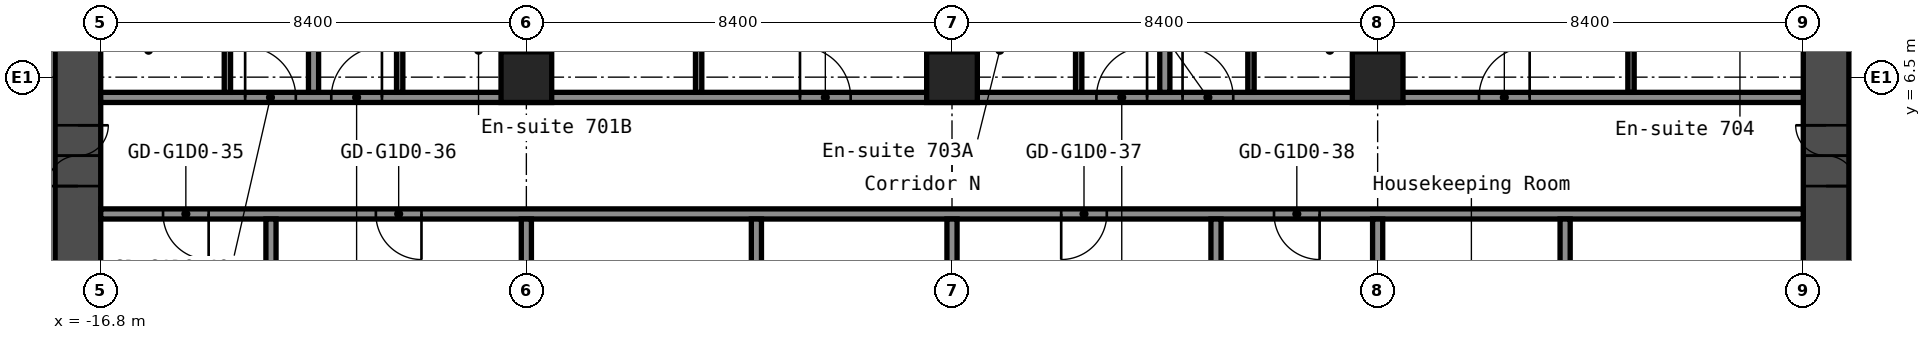
"""IFC4 building model, lengths in metres.
Left out: names, types, materials, properties, quantities, classifications, styles, units other than length and angle.
Written with IfcOpenShell. Run it as: python <this file> out.ifc"""

import sys

from ifc_helpers import new_model, si_unit, direction, frame, frame_2d, origin, origin_2d, place, context, subcontext, project, spatial, rectangle, hollow_rectangle, extrude, element, fill, save


model = new_model("IFC4")
c1 = context("Model", 3, precision=1e-05, world=origin(), true_north=direction((0.0, 1.0)))
c2 = subcontext(c1, "Body", "Model", "MODEL_VIEW")
j1 = project(units=[si_unit("LENGTHUNIT", "METRE"), si_unit("PLANEANGLEUNIT", "RADIAN")], contexts=[c1])
p1 = place(None, origin())
s1 = spatial("IfcSite", under=j1, at=p1, CompositionType="ELEMENT")
p2 = place(p1, origin())
s2 = spatial("IfcBuilding", under=s1, at=p2, CompositionType="ELEMENT")
p3 = place(p2, frame((0.0, 0.0, 29.4)))
s3 = spatial("IfcBuildingStorey", under=s2, at=p3, CompositionType="ELEMENT", Elevation=29.4)
for number, where, z_axis, x_axis in (
    (1, (-8.4, 6.5, 0.0), (0.0, 0.0, 1.0), (1.0, 0.0, 0.0)),
    (2, (0.0, 6.5, 0.0), (0.0, 0.0, 1.0), (1.0, 0.0, 0.0)),
    (3, (8.4, 6.5, 0.0), (0.0, 0.0, 1.0), (1.0, 0.0, 0.0)),
):
    element("IfcColumn", number, at=place(p3, frame(where, z_axis=z_axis, x_axis=x_axis)), inside=s3, PredefinedType="COLUMN", context=c2, shape_type="SweptSolid", body=[
        extrude(hollow_rectangle(XDim=1.0, YDim=1.0, WallThickness=0.04, at=origin_2d()), origin(), (0.0, 0.0, 1.0), 2.8),
    ])
p4 = place(p3, frame((-17.25, -8.4, 0.0), z_axis=(0.0, 0.0, 1.0), x_axis=(0.0, 1.0, 0.0)))
e4 = element("IfcWall", 4, at=p4, inside=s3, PredefinedType="SHEAR", context=c2, shape_type="SweptSolid", body=[
    extrude(rectangle(XDim=16.8, YDim=0.9, at=frame_2d((8.4, 0.0))), origin(), (0.0, 0.0, 1.0), 2.8),
])
p5 = place(p4, frame((12.75, 0.0, 0.0)))
e5 = element("IfcOpeningElement", 5, at=p5, cuts=e4, PredefinedType="OPENING", context=c2, shape_type="SweptSolid", body=[
    extrude(rectangle(XDim=1.2, YDim=2.1, at=frame_2d((0.6, 1.05))), frame((0.0, 0.46, 0.0), z_axis=(0.0, -1.0, 0.0), x_axis=(1.0, 0.0, 0.0)), (0.0, 0.0, 1.0), 0.92),
])
p6 = place(p4, frame((2.85, 0.0, 0.0)))
e6 = element("IfcOpeningElement", 6, at=p6, cuts=e4, PredefinedType="OPENING", context=c2, shape_type="SweptSolid", body=[
    extrude(rectangle(XDim=1.2, YDim=2.1, at=frame_2d((0.6, 1.05))), frame((0.0, 0.46, 0.0), z_axis=(0.0, -1.0, 0.0), x_axis=(1.0, 0.0, 0.0)), (0.0, 0.0, 1.0), 0.92),
])
p7 = place(p3, frame((17.25, -8.4, 0.0), z_axis=(0.0, 0.0, 1.0), x_axis=(0.0, 1.0, 0.0)))
e7 = element("IfcWall", 7, at=p7, inside=s3, PredefinedType="SHEAR", context=c2, shape_type="SweptSolid", body=[
    extrude(rectangle(XDim=16.8, YDim=0.9, at=frame_2d((8.4, 0.0))), origin(), (0.0, 0.0, 1.0), 2.8),
])
p8 = place(p7, frame((12.75, 0.0, 0.0)))
e8 = element("IfcOpeningElement", 8, at=p8, cuts=e7, PredefinedType="OPENING", context=c2, shape_type="SweptSolid", body=[
    extrude(rectangle(XDim=1.2, YDim=2.1, at=frame_2d((0.6, 1.05))), frame((0.0, 0.46, 0.0), z_axis=(0.0, -1.0, 0.0), x_axis=(1.0, 0.0, 0.0)), (0.0, 0.0, 1.0), 0.92),
])
p9 = place(p7, frame((2.85, 0.0, 0.0)))
e9 = element("IfcOpeningElement", 9, at=p9, cuts=e7, PredefinedType="OPENING", context=c2, shape_type="SweptSolid", body=[
    extrude(rectangle(XDim=1.2, YDim=2.1, at=frame_2d((0.6, 1.05))), frame((0.0, 0.46, 0.0), z_axis=(0.0, -1.0, 0.0), x_axis=(1.0, 0.0, 0.0)), (0.0, 0.0, 1.0), 0.92),
])
p10 = place(p3, frame((-16.8, 3.8, 0.0), z_axis=(0.0, 0.0, 1.0), x_axis=(1.0, 0.0, 0.0)))
e10 = element("IfcWall", 10, at=p10, inside=s3, PredefinedType="PARTITIONING", context=c2, shape_type="SweptSolid", body=[
    extrude(rectangle(XDim=33.6, YDim=0.2, at=frame_2d((16.8, 0.0))), origin(), (0.0, 0.0, 1.0), 2.8),
])
p11 = place(p10, frame((1.23, 0.0, 0.0)))
e11 = element("IfcOpeningElement", 11, at=p11, cuts=e10, PredefinedType="OPENING", context=c2, shape_type="SweptSolid", body=[
    extrude(rectangle(XDim=0.9, YDim=2.1, at=frame_2d((0.45, 1.05))), frame((0.0, 0.11, 0.0), z_axis=(0.0, -1.0, 0.0), x_axis=(1.0, 0.0, 0.0)), (0.0, 0.0, 1.0), 0.22),
])
p12 = place(p10, frame((5.43, 0.0, 0.0)))
e12 = element("IfcOpeningElement", 12, at=p12, cuts=e10, PredefinedType="OPENING", context=c2, shape_type="SweptSolid", body=[
    extrude(rectangle(XDim=0.9, YDim=2.1, at=frame_2d((0.45, 1.05))), frame((0.0, 0.11, 0.0), z_axis=(0.0, -1.0, 0.0), x_axis=(1.0, 0.0, 0.0)), (0.0, 0.0, 1.0), 0.22),
])
p13 = place(p10, frame((18.955, 0.0, 0.0)))
e13 = element("IfcOpeningElement", 13, at=p13, cuts=e10, PredefinedType="OPENING", context=c2, shape_type="SweptSolid", body=[
    extrude(rectangle(XDim=0.9, YDim=2.1, at=frame_2d((0.45, 1.05))), frame((0.0, 0.11, 0.0), z_axis=(0.0, -1.0, 0.0), x_axis=(1.0, 0.0, 0.0)), (0.0, 0.0, 1.0), 0.22),
])
p14 = place(p10, frame((23.155, 0.0, 0.0)))
e14 = element("IfcOpeningElement", 14, at=p14, cuts=e10, PredefinedType="OPENING", context=c2, shape_type="SweptSolid", body=[
    extrude(rectangle(XDim=0.9, YDim=2.1, at=frame_2d((0.45, 1.05))), frame((0.0, 0.11, 0.0), z_axis=(0.0, -1.0, 0.0), x_axis=(1.0, 0.0, 0.0)), (0.0, 0.0, 1.0), 0.22),
])
p15 = place(p3, frame((-16.8, 6.1, 0.0), z_axis=(0.0, 0.0, 1.0), x_axis=(1.0, 0.0, 0.0)))
e15 = element("IfcWall", 15, at=p15, inside=s3, PredefinedType="PARTITIONING", context=c2, shape_type="SweptSolid", body=[
    extrude(rectangle(XDim=33.6, YDim=0.2, at=frame_2d((16.8, 0.0))), origin(), (0.0, 0.0, 1.0), 2.8),
])
p16 = place(p15, frame((2.85, 0.0, 0.0)))
e16 = element("IfcOpeningElement", 16, at=p16, cuts=e15, PredefinedType="OPENING", context=c2, shape_type="SweptSolid", body=[
    extrude(rectangle(XDim=1.0, YDim=2.1, at=frame_2d((0.5, 1.05))), frame((0.0, 0.11, 0.0), z_axis=(0.0, -1.0, 0.0), x_axis=(1.0, 0.0, 0.0)), (0.0, 0.0, 1.0), 0.22),
])
p17 = place(p15, frame((4.55, 0.0, 0.0)))
e17 = element("IfcOpeningElement", 17, at=p17, cuts=e15, PredefinedType="OPENING", context=c2, shape_type="SweptSolid", body=[
    extrude(rectangle(XDim=1.0, YDim=2.1, at=frame_2d((0.5, 1.05))), frame((0.0, 0.11, 0.0), z_axis=(0.0, -1.0, 0.0), x_axis=(1.0, 0.0, 0.0)), (0.0, 0.0, 1.0), 0.22),
])
p18 = place(p15, frame((13.8, 0.0, 0.0)))
e18 = element("IfcOpeningElement", 18, at=p18, cuts=e15, PredefinedType="OPENING", context=c2, shape_type="SweptSolid", body=[
    extrude(rectangle(XDim=1.0, YDim=2.1, at=frame_2d((0.5, 1.05))), frame((0.0, 0.11, 0.0), z_axis=(0.0, -1.0, 0.0), x_axis=(1.0, 0.0, 0.0)), (0.0, 0.0, 1.0), 0.22),
])
p19 = place(p15, frame((19.65, 0.0, 0.0)))
e19 = element("IfcOpeningElement", 19, at=p19, cuts=e15, PredefinedType="OPENING", context=c2, shape_type="SweptSolid", body=[
    extrude(rectangle(XDim=1.0, YDim=2.1, at=frame_2d((0.5, 1.05))), frame((0.0, 0.11, 0.0), z_axis=(0.0, -1.0, 0.0), x_axis=(1.0, 0.0, 0.0)), (0.0, 0.0, 1.0), 0.22),
])
p20 = place(p15, frame((21.35, 0.0, 0.0)))
e20 = element("IfcOpeningElement", 20, at=p20, cuts=e15, PredefinedType="OPENING", context=c2, shape_type="SweptSolid", body=[
    extrude(rectangle(XDim=1.0, YDim=2.1, at=frame_2d((0.5, 1.05))), frame((0.0, 0.11, 0.0), z_axis=(0.0, -1.0, 0.0), x_axis=(1.0, 0.0, 0.0)), (0.0, 0.0, 1.0), 0.22),
])
p21 = place(p15, frame((27.2, 0.0, 0.0)))
e21 = element("IfcOpeningElement", 21, at=p21, cuts=e15, PredefinedType="OPENING", context=c2, shape_type="SweptSolid", body=[
    extrude(rectangle(XDim=1.0, YDim=2.1, at=frame_2d((0.5, 1.05))), frame((0.0, 0.11, 0.0), z_axis=(0.0, -1.0, 0.0), x_axis=(1.0, 0.0, 0.0)), (0.0, 0.0, 1.0), 0.22),
])
p22 = place(p3, frame((-14.3, 6.2, 0.0), z_axis=(0.0, 0.0, 1.0), x_axis=(0.0, 1.0, 0.0)))
e22 = element("IfcWall", 22, at=p22, inside=s3, PredefinedType="PARTITIONING", context=c2, shape_type="SweptSolid", body=[
    extrude(rectangle(XDim=2.9, YDim=0.125, at=frame_2d((1.45, 0.0))), origin(), (0.0, 0.0, 1.0), 2.8),
])
p23 = place(p22, frame((1.5, 0.0, 0.0)))
e23 = element("IfcOpeningElement", 23, at=p23, cuts=e22, PredefinedType="OPENING", context=c2, shape_type="SweptSolid", body=[
    extrude(rectangle(XDim=0.8, YDim=2.1, at=frame_2d((0.4, 1.05))), frame((0.0, 0.073, 0.0), z_axis=(0.0, -1.0, 0.0), x_axis=(1.0, 0.0, 0.0)), (0.0, 0.0, 1.0), 0.145),
])
p24 = place(p3, frame((-13.44, -3.7, 0.0), z_axis=(0.0, 0.0, 1.0), x_axis=(0.0, 1.0, 0.0)))
e24 = element("IfcWall", 24, at=p24, inside=s3, PredefinedType="PARTITIONING", context=c2, shape_type="SweptSolid", body=[
    extrude(rectangle(XDim=7.4, YDim=0.2, at=frame_2d((3.7, 0.0))), origin(), (0.0, 0.0, 1.0), 2.8),
])
p25 = place(p3, frame((-12.6, 6.2, 0.0), z_axis=(0.0, 0.0, 1.0), x_axis=(0.0, 1.0, 0.0)))
e25 = element("IfcWall", 25, at=p25, inside=s3, PredefinedType="PARTITIONING", context=c2, shape_type="SweptSolid", body=[
    extrude(rectangle(XDim=14.1, YDim=0.2, at=frame_2d((7.05, 0.0))), origin(), (0.0, 0.0, 1.0), 2.8),
])
p26 = place(p3, frame((-10.9, 6.2, 0.0), z_axis=(0.0, 0.0, 1.0), x_axis=(0.0, 1.0, 0.0)))
e26 = element("IfcWall", 26, at=p26, inside=s3, PredefinedType="PARTITIONING", context=c2, shape_type="SweptSolid", body=[
    extrude(rectangle(XDim=2.9, YDim=0.125, at=frame_2d((1.45, 0.0))), origin(), (0.0, 0.0, 1.0), 2.8),
])
p27 = place(p26, frame((1.5, 0.0, 0.0)))
e27 = element("IfcOpeningElement", 27, at=p27, cuts=e26, PredefinedType="OPENING", context=c2, shape_type="SweptSolid", body=[
    extrude(rectangle(XDim=0.8, YDim=2.1, at=frame_2d((0.4, 1.05))), frame((0.0, 0.073, 0.0), z_axis=(0.0, -1.0, 0.0), x_axis=(1.0, 0.0, 0.0)), (0.0, 0.0, 1.0), 0.145),
])
p28 = place(p3, frame((-8.4, -3.7, 0.0), z_axis=(0.0, 0.0, 1.0), x_axis=(0.0, 1.0, 0.0)))
e28 = element("IfcWall", 28, at=p28, inside=s3, PredefinedType="PARTITIONING", context=c2, shape_type="SweptSolid", body=[
    extrude(rectangle(XDim=7.4, YDim=0.2, at=frame_2d((3.7, 0.0))), origin(), (0.0, 0.0, 1.0), 2.8),
])
p29 = place(p3, frame((-8.4, 6.99, 0.0), z_axis=(0.0, 0.0, 1.0), x_axis=(0.0, 1.0, 0.0)))
e29 = element("IfcWall", 29, at=p29, inside=s3, PredefinedType="PARTITIONING", context=c2, shape_type="SweptSolid", body=[
    extrude(rectangle(XDim=13.31, YDim=0.2, at=frame_2d((6.655, 0.0))), origin(), (0.0, 0.0, 1.0), 2.8),
])
p30 = place(p3, frame((-5.0, 6.2, 0.0), z_axis=(0.0, 0.0, 1.0), x_axis=(0.0, 1.0, 0.0)))
e30 = element("IfcWall", 30, at=p30, inside=s3, PredefinedType="PARTITIONING", context=c2, shape_type="SweptSolid", body=[
    extrude(rectangle(XDim=3.3, YDim=0.125, at=frame_2d((1.65, 0.0))), origin(), (0.0, 0.0, 1.0), 2.8),
])
for number, where, z_axis, x_axis in (
    (31, (-3.86, -3.7, 0.0), (0.0, 0.0, 1.0), (0.0, 1.0, 0.0)),
    (32, (0.0, -3.7, 0.0), (0.0, 0.0, 1.0), (0.0, 1.0, 0.0)),
):
    element("IfcWall", number, at=place(p3, frame(where, z_axis=z_axis, x_axis=x_axis)), inside=s3, PredefinedType="PARTITIONING", context=c2, shape_type="SweptSolid", body=[
        extrude(rectangle(XDim=7.4, YDim=0.2, at=frame_2d((3.7, 0.0))), origin(), (0.0, 0.0, 1.0), 2.8),
    ])
p31 = place(p3, frame((0.0, 6.99, 0.0), z_axis=(0.0, 0.0, 1.0), x_axis=(0.0, 1.0, 0.0)))
e33 = element("IfcWall", 33, at=p31, inside=s3, PredefinedType="PARTITIONING", context=c2, shape_type="SweptSolid", body=[
    extrude(rectangle(XDim=13.31, YDim=0.2, at=frame_2d((6.655, 0.0))), origin(), (0.0, 0.0, 1.0), 2.8),
])
p32 = place(p3, frame((2.5, 6.2, 0.0), z_axis=(0.0, 0.0, 1.0), x_axis=(0.0, 1.0, 0.0)))
e34 = element("IfcWall", 34, at=p32, inside=s3, PredefinedType="PARTITIONING", context=c2, shape_type="SweptSolid", body=[
    extrude(rectangle(XDim=2.9, YDim=0.125, at=frame_2d((1.45, 0.0))), origin(), (0.0, 0.0, 1.0), 2.8),
])
p33 = place(p32, frame((1.5, 0.0, 0.0)))
e35 = element("IfcOpeningElement", 35, at=p33, cuts=e34, PredefinedType="OPENING", context=c2, shape_type="SweptSolid", body=[
    extrude(rectangle(XDim=0.8, YDim=2.1, at=frame_2d((0.4, 1.05))), frame((0.0, 0.073, 0.0), z_axis=(0.0, -1.0, 0.0), x_axis=(1.0, 0.0, 0.0)), (0.0, 0.0, 1.0), 0.145),
])
p34 = place(p3, frame((4.2, 6.2, 0.0), z_axis=(0.0, 0.0, 1.0), x_axis=(0.0, 1.0, 0.0)))
e36 = element("IfcWall", 36, at=p34, inside=s3, PredefinedType="PARTITIONING", context=c2, shape_type="SweptSolid", body=[
    extrude(rectangle(XDim=14.1, YDim=0.2, at=frame_2d((7.05, 0.0))), origin(), (0.0, 0.0, 1.0), 2.8),
])
p35 = place(p3, frame((5.21, -3.7, 0.0), z_axis=(0.0, 0.0, 1.0), x_axis=(0.0, 1.0, 0.0)))
e37 = element("IfcWall", 37, at=p35, inside=s3, PredefinedType="PARTITIONING", context=c2, shape_type="SweptSolid", body=[
    extrude(rectangle(XDim=7.4, YDim=0.2, at=frame_2d((3.7, 0.0))), origin(), (0.0, 0.0, 1.0), 2.8),
])
p36 = place(p3, frame((5.9, 6.2, 0.0), z_axis=(0.0, 0.0, 1.0), x_axis=(0.0, 1.0, 0.0)))
e38 = element("IfcWall", 38, at=p36, inside=s3, PredefinedType="PARTITIONING", context=c2, shape_type="SweptSolid", body=[
    extrude(rectangle(XDim=2.9, YDim=0.125, at=frame_2d((1.45, 0.0))), origin(), (0.0, 0.0, 1.0), 2.8),
])
p37 = place(p36, frame((1.5, 0.0, 0.0)))
e39 = element("IfcOpeningElement", 39, at=p37, cuts=e38, PredefinedType="OPENING", context=c2, shape_type="SweptSolid", body=[
    extrude(rectangle(XDim=0.8, YDim=2.1, at=frame_2d((0.4, 1.05))), frame((0.0, 0.073, 0.0), z_axis=(0.0, -1.0, 0.0), x_axis=(1.0, 0.0, 0.0)), (0.0, 0.0, 1.0), 0.145),
])
p38 = place(p3, frame((8.4, -3.7, 0.0), z_axis=(0.0, 0.0, 1.0), x_axis=(0.0, 1.0, 0.0)))
e40 = element("IfcWall", 40, at=p38, inside=s3, PredefinedType="PARTITIONING", context=c2, shape_type="SweptSolid", body=[
    extrude(rectangle(XDim=7.4, YDim=0.2, at=frame_2d((3.7, 0.0))), origin(), (0.0, 0.0, 1.0), 2.8),
])
p39 = place(p3, frame((8.4, 6.99, 0.0), z_axis=(0.0, 0.0, 1.0), x_axis=(0.0, 1.0, 0.0)))
e41 = element("IfcWall", 41, at=p39, inside=s3, PredefinedType="PARTITIONING", context=c2, shape_type="SweptSolid", body=[
    extrude(rectangle(XDim=13.31, YDim=0.2, at=frame_2d((6.655, 0.0))), origin(), (0.0, 0.0, 1.0), 2.8),
])
p40 = place(p3, frame((12.1, -3.7, 0.0), z_axis=(0.0, 0.0, 1.0), x_axis=(0.0, 1.0, 0.0)))
e42 = element("IfcWall", 42, at=p40, inside=s3, PredefinedType="PARTITIONING", context=c2, shape_type="SweptSolid", body=[
    extrude(rectangle(XDim=7.4, YDim=0.2, at=frame_2d((3.7, 0.0))), origin(), (0.0, 0.0, 1.0), 2.8),
])
p41 = place(p3, frame((13.4, 6.2, 0.0), z_axis=(0.0, 0.0, 1.0), x_axis=(0.0, 1.0, 0.0)))
e43 = element("IfcWall", 43, at=p41, inside=s3, PredefinedType="PARTITIONING", context=c2, shape_type="SweptSolid", body=[
    extrude(rectangle(XDim=3.3, YDim=0.125, at=frame_2d((1.65, 0.0))), origin(), (0.0, 0.0, 1.0), 2.8),
])
p42 = place(p5, origin())
e44 = element("IfcDoor", 44, at=p42, inside=s3, OperationType="DOUBLE_DOOR_SINGLE_SWING", PredefinedType="DOOR", context=c2, shape_type="SweptSolid", body=[
    extrude(rectangle(XDim=1.2, YDim=2.1, at=frame_2d((0.6, 1.05))), frame((0.0, 0.025, 0.0), z_axis=(0.0, -1.0, 0.0), x_axis=(1.0, 0.0, 0.0)), (0.0, 0.0, 1.0), 0.05),
])
fill(e5, e44)
p43 = place(p8, origin())
e45 = element("IfcDoor", 45, at=p43, inside=s3, OperationType="DOUBLE_DOOR_SINGLE_SWING", PredefinedType="DOOR", context=c2, shape_type="SweptSolid", body=[
    extrude(rectangle(XDim=1.2, YDim=2.1, at=frame_2d((0.6, 1.05))), frame((0.0, 0.025, 0.0), z_axis=(0.0, -1.0, 0.0), x_axis=(1.0, 0.0, 0.0)), (0.0, 0.0, 1.0), 0.05),
])
fill(e8, e45)
p44 = place(p11, origin())
e46 = element("IfcDoor", 46, at=p44, inside=s3, OperationType="SINGLE_SWING_RIGHT", PredefinedType="DOOR", context=c2, shape_type="SweptSolid", body=[
    extrude(rectangle(XDim=0.9, YDim=2.1, at=frame_2d((0.45, 1.05))), frame((0.0, 0.025, 0.0), z_axis=(0.0, -1.0, 0.0), x_axis=(1.0, 0.0, 0.0)), (0.0, 0.0, 1.0), 0.05),
])
fill(e11, e46)
p45 = place(p12, origin())
e47 = element("IfcDoor", 47, at=p45, inside=s3, OperationType="SINGLE_SWING_RIGHT", PredefinedType="DOOR", context=c2, shape_type="SweptSolid", body=[
    extrude(rectangle(XDim=0.9, YDim=2.1, at=frame_2d((0.45, 1.05))), frame((0.0, 0.025, 0.0), z_axis=(0.0, -1.0, 0.0), x_axis=(1.0, 0.0, 0.0)), (0.0, 0.0, 1.0), 0.05),
])
fill(e12, e47)
p46 = place(p13, origin())
e48 = element("IfcDoor", 48, at=p46, inside=s3, OperationType="SINGLE_SWING_LEFT", PredefinedType="DOOR", context=c2, shape_type="SweptSolid", body=[
    extrude(rectangle(XDim=0.9, YDim=2.1, at=frame_2d((0.45, 1.05))), frame((0.0, 0.025, 0.0), z_axis=(0.0, -1.0, 0.0), x_axis=(1.0, 0.0, 0.0)), (0.0, 0.0, 1.0), 0.05),
])
fill(e13, e48)
p47 = place(p14, origin())
e49 = element("IfcDoor", 49, at=p47, inside=s3, OperationType="SINGLE_SWING_RIGHT", PredefinedType="DOOR", context=c2, shape_type="SweptSolid", body=[
    extrude(rectangle(XDim=0.9, YDim=2.1, at=frame_2d((0.45, 1.05))), frame((0.0, 0.025, 0.0), z_axis=(0.0, -1.0, 0.0), x_axis=(1.0, 0.0, 0.0)), (0.0, 0.0, 1.0), 0.05),
])
fill(e14, e49)
p48 = place(p16, origin())
e50 = element("IfcDoor", 50, at=p48, inside=s3, OperationType="SINGLE_SWING_RIGHT", PredefinedType="DOOR", context=c2, shape_type="SweptSolid", body=[
    extrude(rectangle(XDim=1.0, YDim=2.1, at=frame_2d((0.5, 1.05))), frame((0.0, 0.025, 0.0), z_axis=(0.0, -1.0, 0.0), x_axis=(1.0, 0.0, 0.0)), (0.0, 0.0, 1.0), 0.05),
])
fill(e16, e50)
p49 = place(p17, origin())
e51 = element("IfcDoor", 51, at=p49, inside=s3, OperationType="SINGLE_SWING_LEFT", PredefinedType="DOOR", context=c2, shape_type="SweptSolid", body=[
    extrude(rectangle(XDim=1.0, YDim=2.1, at=frame_2d((0.5, 1.05))), frame((0.0, 0.025, 0.0), z_axis=(0.0, -1.0, 0.0), x_axis=(1.0, 0.0, 0.0)), (0.0, 0.0, 1.0), 0.05),
])
fill(e17, e51)
p50 = place(p18, origin())
e52 = element("IfcDoor", 52, at=p50, inside=s3, OperationType="SINGLE_SWING_RIGHT", PredefinedType="DOOR", context=c2, shape_type="SweptSolid", body=[
    extrude(rectangle(XDim=1.0, YDim=2.1, at=frame_2d((0.5, 1.05))), frame((0.0, 0.025, 0.0), z_axis=(0.0, -1.0, 0.0), x_axis=(1.0, 0.0, 0.0)), (0.0, 0.0, 1.0), 0.05),
])
fill(e18, e52)
p51 = place(p19, origin())
e53 = element("IfcDoor", 53, at=p51, inside=s3, OperationType="SINGLE_SWING_LEFT", PredefinedType="DOOR", context=c2, shape_type="SweptSolid", body=[
    extrude(rectangle(XDim=1.0, YDim=2.1, at=frame_2d((0.5, 1.05))), frame((0.0, 0.025, 0.0), z_axis=(0.0, -1.0, 0.0), x_axis=(1.0, 0.0, 0.0)), (0.0, 0.0, 1.0), 0.05),
])
fill(e19, e53)
p52 = place(p20, origin())
e54 = element("IfcDoor", 54, at=p52, inside=s3, OperationType="SINGLE_SWING_RIGHT", PredefinedType="DOOR", context=c2, shape_type="SweptSolid", body=[
    extrude(rectangle(XDim=1.0, YDim=2.1, at=frame_2d((0.5, 1.05))), frame((0.0, 0.025, 0.0), z_axis=(0.0, -1.0, 0.0), x_axis=(1.0, 0.0, 0.0)), (0.0, 0.0, 1.0), 0.05),
])
fill(e20, e54)
p53 = place(p21, origin())
e55 = element("IfcDoor", 55, at=p53, inside=s3, OperationType="SINGLE_SWING_LEFT", PredefinedType="DOOR", context=c2, shape_type="SweptSolid", body=[
    extrude(rectangle(XDim=1.0, YDim=2.1, at=frame_2d((0.5, 1.05))), frame((0.0, 0.025, 0.0), z_axis=(0.0, -1.0, 0.0), x_axis=(1.0, 0.0, 0.0)), (0.0, 0.0, 1.0), 0.05),
])
fill(e21, e55)
save(model, sys.argv[1])
